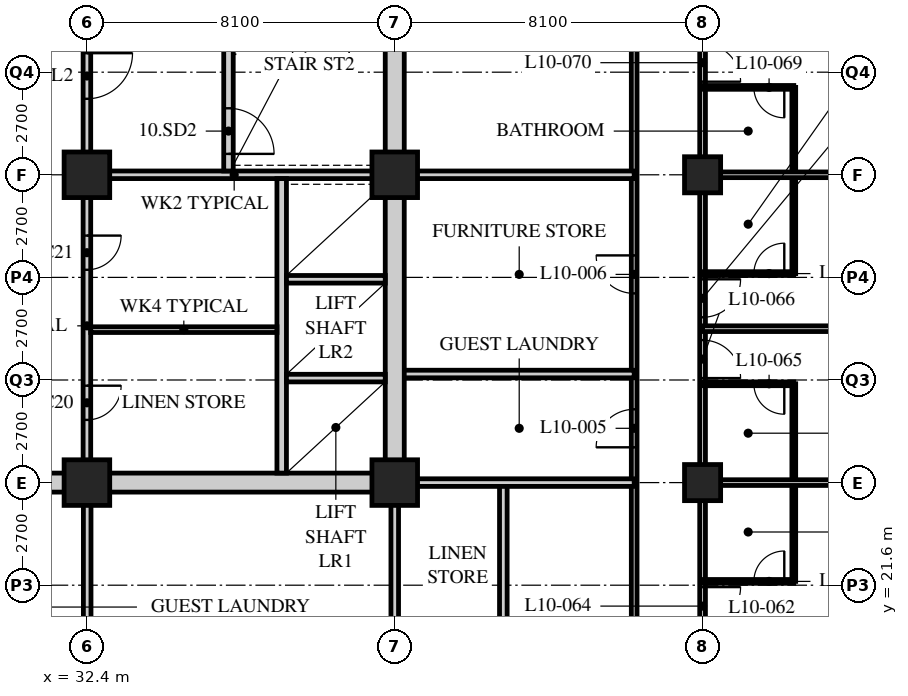
"""IFC4 building model, lengths in metres.
Left out: names, types, materials, properties, quantities, classifications, styles, units other than length and angle.
Written with IfcOpenShell. Run it as: python <this file> out.ifc"""

import sys

from ifc_helpers import new_model, si_unit, direction, frame, frame_2d, origin, origin_2d, place, context, subcontext, project, spatial, rectangle, hollow_rectangle, extrude, element, fill, save


model = new_model("IFC4")
c1 = context("Model", 3, precision=1e-05, world=origin(), true_north=direction((0.0, 1.0)))
c2 = subcontext(c1, "Body", "Model", "MODEL_VIEW")
j1 = project(units=[si_unit("LENGTHUNIT", "METRE"), si_unit("PLANEANGLEUNIT", "RADIAN")], contexts=[c1])
p1 = place(None, origin())
s1 = spatial("IfcSite", under=j1, at=p1, CompositionType="ELEMENT")
p2 = place(p1, origin())
s2 = spatial("IfcBuilding", under=s1, at=p2, CompositionType="ELEMENT")
p3 = place(p2, frame((0.0, 0.0, 46.6)))
s3 = spatial("IfcBuildingStorey", under=s2, at=p3, CompositionType="ELEMENT", Elevation=46.6)
for number, where, z_axis, x_axis in (
    (1, (32.4, 24.3, 0.0), (0.0, 0.0, 1.0), (1.0, 0.0, 0.0)),
    (2, (32.4, 32.4, 0.0), (0.0, 0.0, 1.0), (1.0, 0.0, 0.0)),
    (3, (40.5, 24.3, 0.0), (0.0, 0.0, 1.0), (1.0, 0.0, 0.0)),
    (4, (40.5, 32.4, 0.0), (0.0, 0.0, 1.0), (1.0, 0.0, 0.0)),
):
    element("IfcColumn", number, at=place(p3, frame(where, z_axis=z_axis, x_axis=x_axis)), inside=s3, PredefinedType="COLUMN", context=c2, shape_type="SweptSolid", body=[
        extrude(hollow_rectangle(XDim=1.2, YDim=1.2, WallThickness=0.12, at=origin_2d()), origin(), (0.0, 0.0, 1.0), 3.4),
    ])
for number, where, z_axis, x_axis in (
    (5, (48.6, 24.3, 0.0), (0.0, 0.0, 1.0), (1.0, 0.0, 0.0)),
    (6, (48.6, 32.4, 0.0), (0.0, 0.0, 1.0), (1.0, 0.0, 0.0)),
):
    element("IfcColumn", number, at=place(p3, frame(where, z_axis=z_axis, x_axis=x_axis)), inside=s3, PredefinedType="COLUMN", context=c2, shape_type="SweptSolid", body=[
        extrude(hollow_rectangle(XDim=0.95, YDim=0.95, WallThickness=0.095, at=origin_2d()), origin(), (0.0, 0.0, 1.0), 3.4),
    ])
p4 = place(p3, frame((48.6, 16.2, 0.0), z_axis=(0.0, 0.0, 1.0), x_axis=(0.0, 1.0, 0.0)))
e7 = element("IfcWall", 7, at=p4, inside=s3, PredefinedType="PARTITIONING", context=c2, shape_type="SweptSolid", body=[
    extrude(rectangle(XDim=26.1, YDim=0.15, at=frame_2d((13.05, 0.0))), origin(), (0.0, 0.0, 1.0), 2.578),
])
p5 = place(p4, frame((2.75, 0.0, 0.0)))
e8 = element("IfcOpeningElement", 8, at=p5, cuts=e7, PredefinedType="OPENING", context=c2, shape_type="SweptSolid", body=[
    extrude(rectangle(XDim=1.0, YDim=2.1, at=frame_2d((0.5, 1.05))), frame((0.0, 0.085, 0.0), z_axis=(0.0, -1.0, 0.0), x_axis=(1.0, 0.0, 0.0)), (0.0, 0.0, 1.0), 0.17),
])
p6 = place(p4, frame((4.35, 0.0, 0.0)))
e9 = element("IfcOpeningElement", 9, at=p6, cuts=e7, PredefinedType="OPENING", context=c2, shape_type="SweptSolid", body=[
    extrude(rectangle(XDim=1.0, YDim=2.1, at=frame_2d((0.5, 1.05))), frame((0.0, 0.085, 0.0), z_axis=(0.0, -1.0, 0.0), x_axis=(1.0, 0.0, 0.0)), (0.0, 0.0, 1.0), 0.17),
])
p7 = place(p4, frame((10.85, 0.0, 0.0)))
e10 = element("IfcOpeningElement", 10, at=p7, cuts=e7, PredefinedType="OPENING", context=c2, shape_type="SweptSolid", body=[
    extrude(rectangle(XDim=1.0, YDim=2.1, at=frame_2d((0.5, 1.05))), frame((0.0, 0.085, 0.0), z_axis=(0.0, -1.0, 0.0), x_axis=(1.0, 0.0, 0.0)), (0.0, 0.0, 1.0), 0.17),
])
p8 = place(p4, frame((12.45, 0.0, 0.0)))
e11 = element("IfcOpeningElement", 11, at=p8, cuts=e7, PredefinedType="OPENING", context=c2, shape_type="SweptSolid", body=[
    extrude(rectangle(XDim=1.0, YDim=2.1, at=frame_2d((0.5, 1.05))), frame((0.0, 0.085, 0.0), z_axis=(0.0, -1.0, 0.0), x_axis=(1.0, 0.0, 0.0)), (0.0, 0.0, 1.0), 0.17),
])
p9 = place(p4, frame((18.65, 0.0, 0.0)))
e12 = element("IfcOpeningElement", 12, at=p9, cuts=e7, PredefinedType="OPENING", context=c2, shape_type="SweptSolid", body=[
    extrude(rectangle(XDim=1.0, YDim=2.1, at=frame_2d((0.5, 1.05))), frame((0.0, 0.085, 0.0), z_axis=(0.0, -1.0, 0.0), x_axis=(1.0, 0.0, 0.0)), (0.0, 0.0, 1.0), 0.17),
])
p10 = place(p4, frame((22.7, 0.0, 0.0)))
e13 = element("IfcOpeningElement", 13, at=p10, cuts=e7, PredefinedType="OPENING", context=c2, shape_type="SweptSolid", body=[
    extrude(rectangle(XDim=1.0, YDim=2.1, at=frame_2d((0.5, 1.05))), frame((0.0, 0.085, 0.0), z_axis=(0.0, -1.0, 0.0), x_axis=(1.0, 0.0, 0.0)), (0.0, 0.0, 1.0), 0.17),
])
p11 = place(p3, frame((46.8, 18.0, 0.0), z_axis=(0.0, 0.0, 1.0), x_axis=(0.0, 1.0, 0.0)))
e14 = element("IfcWall", 14, at=p11, inside=s3, PredefinedType="PARTITIONING", context=c2, shape_type="SweptSolid", body=[
    extrude(rectangle(XDim=22.5, YDim=0.15, at=frame_2d((11.25, 0.0))), origin(), (0.0, 0.0, 1.0), 3.19),
])
p12 = place(p11, frame((7.229, 0.0, 0.0)))
e15 = element("IfcOpeningElement", 15, at=p12, cuts=e14, PredefinedType="OPENING", context=c2, shape_type="SweptSolid", body=[
    extrude(rectangle(XDim=1.0, YDim=2.1, at=frame_2d((0.5, 1.05))), frame((0.0, 0.085, 0.0), z_axis=(0.0, -1.0, 0.0), x_axis=(1.0, 0.0, 0.0)), (0.0, 0.0, 1.0), 0.17),
])
p13 = place(p11, frame((11.279, 0.0, 0.0)))
e16 = element("IfcOpeningElement", 16, at=p13, cuts=e14, PredefinedType="OPENING", context=c2, shape_type="SweptSolid", body=[
    extrude(rectangle(XDim=1.0, YDim=2.1, at=frame_2d((0.5, 1.05))), frame((0.0, 0.085, 0.0), z_axis=(0.0, -1.0, 0.0), x_axis=(1.0, 0.0, 0.0)), (0.0, 0.0, 1.0), 0.17),
])
p14 = place(p11, frame((17.95, 0.0, 0.0)))
e17 = element("IfcOpeningElement", 17, at=p14, cuts=e14, PredefinedType="OPENING", context=c2, shape_type="SweptSolid", body=[
    extrude(rectangle(XDim=1.0, YDim=2.1, at=frame_2d((0.5, 1.05))), frame((0.0, 0.085, 0.0), z_axis=(0.0, -1.0, 0.0), x_axis=(1.0, 0.0, 0.0)), (0.0, 0.0, 1.0), 0.17),
])
p15 = place(p3, frame((40.5, 32.4, 0.0), z_axis=(0.0, 0.0, 1.0), x_axis=(1.0, 0.0, 0.0)))
e18 = element("IfcWall", 18, at=p15, inside=s3, PredefinedType="SOLIDWALL", context=c2, shape_type="SweptSolid", body=[
    extrude(rectangle(XDim=6.3, YDim=0.2, at=frame_2d((3.15, 0.0))), origin(), (0.0, 0.0, 1.0), 2.578),
])
p16 = place(p3, frame((46.8, 27.157, 0.0), z_axis=(0.0, 0.0, 1.0), x_axis=(-1.0, 0.0, 0.0)))
e19 = element("IfcWall", 19, at=p16, inside=s3, PredefinedType="SOLIDWALL", context=c2, shape_type="SweptSolid", body=[
    extrude(rectangle(XDim=6.3, YDim=0.2, at=frame_2d((3.15, 0.0))), origin(), (0.0, 0.0, 1.0), 3.19),
])
for number, where, z_axis, x_axis in (
    (20, (40.5, 18.0, 0.0), (0.0, 0.0, 1.0), (0.0, 1.0, 0.0)),
    (21, (32.407, 18.0, 0.0), (0.0, 0.0, 1.0), (0.0, 1.0, 0.0)),
):
    element("IfcWall", number, at=place(p3, frame(where, z_axis=z_axis, x_axis=x_axis)), inside=s3, PredefinedType="SOLIDWALL", context=c2, shape_type="SweptSolid", body=[
        extrude(rectangle(XDim=6.3, YDim=0.2, at=frame_2d((3.15, 0.0))), origin(), (0.0, 0.0, 1.0), 2.578),
    ])
p17 = place(p3, frame((43.357, 18.0, 0.0), z_axis=(0.0, 0.0, 1.0), x_axis=(0.0, 1.0, 0.0)))
e22 = element("IfcWall", 22, at=p17, inside=s3, PredefinedType="SOLIDWALL", context=c2, shape_type="SweptSolid", body=[
    extrude(rectangle(XDim=6.3, YDim=0.2, at=frame_2d((3.15, 0.0))), origin(), (0.0, 0.0, 1.0), 3.19),
])
p18 = place(p3, frame((40.5, 24.3, 0.0), z_axis=(0.0, 0.0, 1.0), x_axis=(1.0, 0.0, 0.0)))
e23 = element("IfcWall", 23, at=p18, inside=s3, PredefinedType="SOLIDWALL", context=c2, shape_type="SweptSolid", body=[
    extrude(rectangle(XDim=6.3, YDim=0.2, at=frame_2d((3.15, 0.0))), origin(), (0.0, 0.0, 1.0), 2.578),
])
p19 = place(p3, frame((51.0, 21.7, 0.0), z_axis=(0.0, 0.0, 1.0), x_axis=(0.0, 1.0, 0.0)))
e24 = element("IfcWall", 24, at=p19, inside=s3, PredefinedType="PARTITIONING", context=c2, shape_type="SweptSolid", body=[
    extrude(rectangle(XDim=5.2, YDim=0.1, at=frame_2d((2.6, 0.0))), origin(), (0.0, 0.0, 1.0), 3.19),
])
p20 = place(p3, frame((48.6, 21.7, 0.0), z_axis=(0.0, 0.0, 1.0), x_axis=(1.0, 0.0, 0.0)))
e25 = element("IfcWall", 25, at=p20, inside=s3, PredefinedType="PARTITIONING", context=c2, shape_type="SweptSolid", body=[
    extrude(rectangle(XDim=2.4, YDim=0.1, at=frame_2d((1.2, 0.0))), origin(), (0.0, 0.0, 1.0), 3.19),
])
p21 = place(p20, frame((1.35, 0.0, 0.0)))
e26 = element("IfcOpeningElement", 26, at=p21, cuts=e25, PredefinedType="OPENING", context=c2, shape_type="SweptSolid", body=[
    extrude(rectangle(XDim=0.8, YDim=2.1, at=frame_2d((0.4, 1.05))), frame((0.0, 0.06, 0.0), z_axis=(0.0, -1.0, 0.0), x_axis=(1.0, 0.0, 0.0)), (0.0, 0.0, 1.0), 0.12),
])
p22 = place(p3, frame((48.6, 24.3, 0.0), z_axis=(0.0, 0.0, 1.0), x_axis=(1.0, 0.0, 0.0)))
e27 = element("IfcWall", 27, at=p22, inside=s3, PredefinedType="PARTITIONING", context=c2, shape_type="SweptSolid", body=[
    extrude(rectangle(XDim=7.8, YDim=0.15, at=frame_2d((3.9, 0.0))), origin(), (0.0, 0.0, 1.0), 2.578),
])
p23 = place(p3, frame((48.6, 26.9, 0.0), z_axis=(0.0, 0.0, 1.0), x_axis=(1.0, 0.0, 0.0)))
e28 = element("IfcWall", 28, at=p23, inside=s3, PredefinedType="PARTITIONING", context=c2, shape_type="SweptSolid", body=[
    extrude(rectangle(XDim=2.4, YDim=0.1, at=frame_2d((1.2, 0.0))), origin(), (0.0, 0.0, 1.0), 3.19),
])
p24 = place(p23, frame((1.35, 0.0, 0.0)))
e29 = element("IfcOpeningElement", 29, at=p24, cuts=e28, PredefinedType="OPENING", context=c2, shape_type="SweptSolid", body=[
    extrude(rectangle(XDim=0.8, YDim=2.1, at=frame_2d((0.4, 1.05))), frame((0.0, 0.06, 0.0), z_axis=(0.0, -1.0, 0.0), x_axis=(1.0, 0.0, 0.0)), (0.0, 0.0, 1.0), 0.12),
])
p25 = place(p3, frame((48.6, 28.35, 0.0), z_axis=(0.0, 0.0, 1.0), x_axis=(1.0, 0.0, 0.0)))
e30 = element("IfcWall", 30, at=p25, inside=s3, PredefinedType="PARTITIONING", context=c2, shape_type="SweptSolid", body=[
    extrude(rectangle(XDim=7.8, YDim=0.15, at=frame_2d((3.9, 0.0))), origin(), (0.0, 0.0, 1.0), 3.19),
])
p26 = place(p3, frame((51.0, 29.8, 0.0), z_axis=(0.0, 0.0, 1.0), x_axis=(0.0, 1.0, 0.0)))
e31 = element("IfcWall", 31, at=p26, inside=s3, PredefinedType="PARTITIONING", context=c2, shape_type="SweptSolid", body=[
    extrude(rectangle(XDim=4.9, YDim=0.1, at=frame_2d((2.45, 0.0))), origin(), (0.0, 0.0, 1.0), 3.19),
])
p27 = place(p3, frame((48.6, 29.8, 0.0), z_axis=(0.0, 0.0, 1.0), x_axis=(1.0, 0.0, 0.0)))
e32 = element("IfcWall", 32, at=p27, inside=s3, PredefinedType="PARTITIONING", context=c2, shape_type="SweptSolid", body=[
    extrude(rectangle(XDim=2.4, YDim=0.1, at=frame_2d((1.2, 0.0))), origin(), (0.0, 0.0, 1.0), 3.19),
])
p28 = place(p27, frame((1.35, 0.0, 0.0)))
e33 = element("IfcOpeningElement", 33, at=p28, cuts=e32, PredefinedType="OPENING", context=c2, shape_type="SweptSolid", body=[
    extrude(rectangle(XDim=0.8, YDim=2.1, at=frame_2d((0.4, 1.05))), frame((0.0, 0.06, 0.0), z_axis=(0.0, -1.0, 0.0), x_axis=(1.0, 0.0, 0.0)), (0.0, 0.0, 1.0), 0.12),
])
p29 = place(p3, frame((48.6, 32.4, 0.0), z_axis=(0.0, 0.0, 1.0), x_axis=(1.0, 0.0, 0.0)))
e34 = element("IfcWall", 34, at=p29, inside=s3, PredefinedType="PARTITIONING", context=c2, shape_type="SweptSolid", body=[
    extrude(rectangle(XDim=7.8, YDim=0.15, at=frame_2d((3.9, 0.0))), origin(), (0.0, 0.0, 1.0), 2.578),
])
p30 = place(p3, frame((48.6, 34.7, 0.0), z_axis=(0.0, 0.0, 1.0), x_axis=(1.0, 0.0, 0.0)))
e35 = element("IfcWall", 35, at=p30, inside=s3, PredefinedType="PARTITIONING", context=c2, shape_type="SweptSolid", body=[
    extrude(rectangle(XDim=2.4, YDim=0.1, at=frame_2d((1.2, 0.0))), origin(), (0.0, 0.0, 1.0), 3.19),
])
p31 = place(p30, frame((1.35, 0.0, 0.0)))
e36 = element("IfcOpeningElement", 36, at=p31, cuts=e35, PredefinedType="OPENING", context=c2, shape_type="SweptSolid", body=[
    extrude(rectangle(XDim=0.8, YDim=2.1, at=frame_2d((0.4, 1.05))), frame((0.0, 0.06, 0.0), z_axis=(0.0, -1.0, 0.0), x_axis=(1.0, 0.0, 0.0)), (0.0, 0.0, 1.0), 0.12),
])
p32 = place(p3, frame((15.95, 24.3, 0.0), z_axis=(0.0, 0.0, 1.0), x_axis=(1.0, 0.0, 0.0)))
e37 = element("IfcWall", 37, at=p32, inside=s3, PredefinedType="SOLIDWALL", context=c2, shape_type="SweptSolid", body=[
    extrude(rectangle(XDim=24.8, YDim=0.5, at=frame_2d((12.4, 0.0))), origin(), (0.0, 0.0, 1.0), 2.54),
])
p33 = place(p32, frame((11.5, 0.0, 0.0)))
e38 = element("IfcOpeningElement", 38, at=p33, cuts=e37, PredefinedType="OPENING", context=c2, shape_type="SweptSolid", body=[
    extrude(rectangle(XDim=1.8, YDim=2.4, at=frame_2d((0.9, 1.2))), frame((0.0, 0.26, 0.0), z_axis=(0.0, -1.0, 0.0), x_axis=(1.0, 0.0, 0.0)), (0.0, 0.0, 1.0), 0.52),
])
p34 = place(p3, frame((40.5, 24.55, 0.0), z_axis=(0.0, 0.0, 1.0), x_axis=(0.0, 1.0, 0.0)))
e39 = element("IfcWall", 39, at=p34, inside=s3, PredefinedType="SOLIDWALL", context=c2, shape_type="SweptSolid", body=[
    extrude(rectangle(XDim=15.7, YDim=0.5, at=frame_2d((7.85, 0.0))), origin(), (0.0, 0.0, 1.0), 2.578),
])
p35 = place(p3, frame((32.3, 32.4, 0.0), z_axis=(0.0, 0.0, 1.0), x_axis=(1.0, 0.0, 0.0)))
e40 = element("IfcWall", 40, at=p35, inside=s3, PredefinedType="SOLIDWALL", context=c2, shape_type="SweptSolid", body=[
    extrude(rectangle(XDim=7.95, YDim=0.2, at=frame_2d((3.975, 0.0))), origin(), (0.0, 0.0, 1.0), 2.578),
])
p36 = place(p3, frame((32.4, 32.5, 0.0), z_axis=(0.0, 0.0, 1.0), x_axis=(0.0, 1.0, 0.0)))
e41 = element("IfcWall", 41, at=p36, inside=s3, PredefinedType="SOLIDWALL", context=c2, shape_type="SweptSolid", body=[
    extrude(rectangle(XDim=7.75, YDim=0.2, at=frame_2d((3.875, 0.0))), origin(), (0.0, 0.0, 1.0), 2.578),
])
p37 = place(p36, frame((1.9, 0.0, 0.0)))
e42 = element("IfcOpeningElement", 42, at=p37, cuts=e41, PredefinedType="OPENING", context=c2, shape_type="SweptSolid", body=[
    extrude(rectangle(XDim=1.2, YDim=2.1, at=frame_2d((0.6, 1.05))), frame((0.0, 0.11, 0.0), z_axis=(0.0, -1.0, 0.0), x_axis=(1.0, 0.0, 0.0)), (0.0, 0.0, 1.0), 0.22),
])
p38 = place(p3, frame((37.525, 24.55, 0.0), z_axis=(0.0, 0.0, 1.0), x_axis=(0.0, 1.0, 0.0)))
e43 = element("IfcWall", 43, at=p38, inside=s3, PredefinedType="SOLIDWALL", context=c2, shape_type="SweptSolid", body=[
    extrude(rectangle(XDim=7.75, YDim=0.25, at=frame_2d((3.875, 0.0))), origin(), (0.0, 0.0, 1.0), 3.19),
])
for number, where, z_axis, x_axis in (
    (44, (37.65, 27.05, 0.0), (0.0, 0.0, 1.0), (1.0, 0.0, 0.0)),
    (45, (37.65, 29.65, 0.0), (0.0, 0.0, 1.0), (1.0, 0.0, 0.0)),
):
    element("IfcWall", number, at=place(p3, frame(where, z_axis=z_axis, x_axis=x_axis)), inside=s3, PredefinedType="SOLIDWALL", context=c2, shape_type="SweptSolid", body=[
        extrude(rectangle(XDim=2.6, YDim=0.2, at=frame_2d((1.3, 0.0))), origin(), (0.0, 0.0, 1.0), 3.19),
    ])
p39 = place(p3, frame((36.125, 32.5, 0.0), z_axis=(0.0, 0.0, 1.0), x_axis=(0.0, 1.0, 0.0)))
e46 = element("IfcWall", 46, at=p39, inside=s3, PredefinedType="SOLIDWALL", context=c2, shape_type="SweptSolid", body=[
    extrude(rectangle(XDim=7.75, YDim=0.25, at=frame_2d((3.875, 0.0))), origin(), (0.0, 0.0, 1.0), 3.19),
])
p40 = place(p39, frame((0.45, 0.0, 0.0)))
e47 = element("IfcOpeningElement", 47, at=p40, cuts=e46, PredefinedType="OPENING", context=c2, shape_type="SweptSolid", body=[
    extrude(rectangle(XDim=1.2, YDim=2.1, at=frame_2d((0.6, 1.05))), frame((0.0, 0.135, 0.0), z_axis=(0.0, -1.0, 0.0), x_axis=(1.0, 0.0, 0.0)), (0.0, 0.0, 1.0), 0.27),
])
p41 = place(p3, frame((32.4, 24.55, 0.0), z_axis=(0.0, 0.0, 1.0), x_axis=(0.0, 1.0, 0.0)))
e48 = element("IfcWall", 48, at=p41, inside=s3, PredefinedType="PARTITIONING", context=c2, shape_type="SweptSolid", body=[
    extrude(rectangle(XDim=7.75, YDim=0.2, at=frame_2d((3.875, 0.0))), origin(), (0.0, 0.0, 1.0), 2.578),
])
p42 = place(p41, frame((1.4, 0.0, 0.0)))
e49 = element("IfcOpeningElement", 49, at=p42, cuts=e48, PredefinedType="OPENING", context=c2, shape_type="SweptSolid", body=[
    extrude(rectangle(XDim=0.9, YDim=2.1, at=frame_2d((0.45, 1.05))), frame((0.0, 0.11, 0.0), z_axis=(0.0, -1.0, 0.0), x_axis=(1.0, 0.0, 0.0)), (0.0, 0.0, 1.0), 0.22),
])
p43 = place(p41, frame((5.35, 0.0, 0.0)))
e50 = element("IfcOpeningElement", 50, at=p43, cuts=e48, PredefinedType="OPENING", context=c2, shape_type="SweptSolid", body=[
    extrude(rectangle(XDim=0.9, YDim=2.1, at=frame_2d((0.45, 1.05))), frame((0.0, 0.11, 0.0), z_axis=(0.0, -1.0, 0.0), x_axis=(1.0, 0.0, 0.0)), (0.0, 0.0, 1.0), 0.22),
])
p44 = place(p3, frame((32.5, 28.325, 0.0), z_axis=(0.0, 0.0, 1.0), x_axis=(1.0, 0.0, 0.0)))
e51 = element("IfcWall", 51, at=p44, inside=s3, PredefinedType="PARTITIONING", context=c2, shape_type="SweptSolid", body=[
    extrude(rectangle(XDim=4.9, YDim=0.15, at=frame_2d((2.45, 0.0))), origin(), (0.0, 0.0, 1.0), 3.19),
])
p45 = place(p12, origin())
e52 = element("IfcDoor", 52, at=p45, inside=s3, OperationType="SINGLE_SWING_LEFT", PredefinedType="DOOR", context=c2, shape_type="SweptSolid", body=[
    extrude(rectangle(XDim=1.0, YDim=2.1, at=frame_2d((0.5, 1.05))), frame((0.0, 0.025, 0.0), z_axis=(0.0, -1.0, 0.0), x_axis=(1.0, 0.0, 0.0)), (0.0, 0.0, 1.0), 0.05),
])
fill(e15, e52)
p46 = place(p13, origin())
e53 = element("IfcDoor", 53, at=p46, inside=s3, OperationType="SINGLE_SWING_RIGHT", PredefinedType="DOOR", context=c2, shape_type="SweptSolid", body=[
    extrude(rectangle(XDim=1.0, YDim=2.1, at=frame_2d((0.5, 1.05))), frame((0.0, 0.025, 0.0), z_axis=(0.0, -1.0, 0.0), x_axis=(1.0, 0.0, 0.0)), (0.0, 0.0, 1.0), 0.05),
])
fill(e16, e53)
p47 = place(p21, origin())
e54 = element("IfcDoor", 54, at=p47, inside=s3, OperationType="SINGLE_SWING_RIGHT", PredefinedType="DOOR", context=c2, shape_type="SweptSolid", body=[
    extrude(rectangle(XDim=0.8, YDim=2.1, at=frame_2d((0.4, 1.05))), frame((0.0, 0.025, 0.0), z_axis=(0.0, -1.0, 0.0), x_axis=(1.0, 0.0, 0.0)), (0.0, 0.0, 1.0), 0.05),
])
fill(e26, e54)
p48 = place(p6, origin())
e55 = element("IfcDoor", 55, at=p48, inside=s3, OperationType="SINGLE_SWING_LEFT", PredefinedType="DOOR", context=c2, shape_type="SweptSolid", body=[
    extrude(rectangle(XDim=1.0, YDim=2.1, at=frame_2d((0.5, 1.05))), frame((0.0, 0.025, 0.0), z_axis=(0.0, -1.0, 0.0), x_axis=(1.0, 0.0, 0.0)), (0.0, 0.0, 1.0), 0.05),
])
fill(e9, e55)
p49 = place(p24, origin())
e56 = element("IfcDoor", 56, at=p49, inside=s3, OperationType="SINGLE_SWING_LEFT", PredefinedType="DOOR", context=c2, shape_type="SweptSolid", body=[
    extrude(rectangle(XDim=0.8, YDim=2.1, at=frame_2d((0.4, 1.05))), frame((0.0, 0.025, 0.0), z_axis=(0.0, -1.0, 0.0), x_axis=(1.0, 0.0, 0.0)), (0.0, 0.0, 1.0), 0.05),
])
fill(e29, e56)
p50 = place(p7, origin())
e57 = element("IfcDoor", 57, at=p50, inside=s3, OperationType="SINGLE_SWING_RIGHT", PredefinedType="DOOR", context=c2, shape_type="SweptSolid", body=[
    extrude(rectangle(XDim=1.0, YDim=2.1, at=frame_2d((0.5, 1.05))), frame((0.0, 0.025, 0.0), z_axis=(0.0, -1.0, 0.0), x_axis=(1.0, 0.0, 0.0)), (0.0, 0.0, 1.0), 0.05),
])
fill(e10, e57)
p51 = place(p28, origin())
e58 = element("IfcDoor", 58, at=p51, inside=s3, OperationType="SINGLE_SWING_RIGHT", PredefinedType="DOOR", context=c2, shape_type="SweptSolid", body=[
    extrude(rectangle(XDim=0.8, YDim=2.1, at=frame_2d((0.4, 1.05))), frame((0.0, 0.025, 0.0), z_axis=(0.0, -1.0, 0.0), x_axis=(1.0, 0.0, 0.0)), (0.0, 0.0, 1.0), 0.05),
])
fill(e33, e58)
p52 = place(p8, origin())
e59 = element("IfcDoor", 59, at=p52, inside=s3, OperationType="SINGLE_SWING_LEFT", PredefinedType="DOOR", context=c2, shape_type="SweptSolid", body=[
    extrude(rectangle(XDim=1.0, YDim=2.1, at=frame_2d((0.5, 1.05))), frame((0.0, 0.025, 0.0), z_axis=(0.0, -1.0, 0.0), x_axis=(1.0, 0.0, 0.0)), (0.0, 0.0, 1.0), 0.05),
])
fill(e11, e59)
p53 = place(p31, origin())
e60 = element("IfcDoor", 60, at=p53, inside=s3, OperationType="SINGLE_SWING_LEFT", PredefinedType="DOOR", context=c2, shape_type="SweptSolid", body=[
    extrude(rectangle(XDim=0.8, YDim=2.1, at=frame_2d((0.4, 1.05))), frame((0.0, 0.025, 0.0), z_axis=(0.0, -1.0, 0.0), x_axis=(1.0, 0.0, 0.0)), (0.0, 0.0, 1.0), 0.05),
])
fill(e36, e60)
p54 = place(p9, origin())
e61 = element("IfcDoor", 61, at=p54, inside=s3, OperationType="SINGLE_SWING_RIGHT", PredefinedType="DOOR", context=c2, shape_type="SweptSolid", body=[
    extrude(rectangle(XDim=1.0, YDim=2.1, at=frame_2d((0.5, 1.05))), frame((0.0, 0.025, 0.0), z_axis=(0.0, -1.0, 0.0), x_axis=(1.0, 0.0, 0.0)), (0.0, 0.0, 1.0), 0.05),
])
fill(e12, e61)
p55 = place(p42, origin())
e62 = element("IfcDoor", 62, at=p55, inside=s3, OperationType="SINGLE_SWING_LEFT", PredefinedType="DOOR", context=c2, shape_type="SweptSolid", body=[
    extrude(rectangle(XDim=0.9, YDim=2.1, at=frame_2d((0.45, 1.05))), frame((0.0, 0.025, 0.0), z_axis=(0.0, -1.0, 0.0), x_axis=(1.0, 0.0, 0.0)), (0.0, 0.0, 1.0), 0.05),
])
fill(e49, e62)
p56 = place(p43, origin())
e63 = element("IfcDoor", 63, at=p56, inside=s3, OperationType="SINGLE_SWING_LEFT", PredefinedType="DOOR", context=c2, shape_type="SweptSolid", body=[
    extrude(rectangle(XDim=0.9, YDim=2.1, at=frame_2d((0.45, 1.05))), frame((0.0, 0.025, 0.0), z_axis=(0.0, -1.0, 0.0), x_axis=(1.0, 0.0, 0.0)), (0.0, 0.0, 1.0), 0.05),
])
fill(e50, e63)
p57 = place(p40, origin())
e64 = element("IfcDoor", 64, at=p57, inside=s3, OperationType="SINGLE_SWING_RIGHT", PredefinedType="DOOR", context=c2, shape_type="SweptSolid", body=[
    extrude(rectangle(XDim=1.2, YDim=2.1, at=frame_2d((0.6, 1.05))), frame((0.0, 0.025, 0.0), z_axis=(0.0, -1.0, 0.0), x_axis=(1.0, 0.0, 0.0)), (0.0, 0.0, 1.0), 0.05),
])
fill(e47, e64)
p58 = place(p37, origin())
e65 = element("IfcDoor", 65, at=p58, inside=s3, OperationType="SINGLE_SWING_LEFT", PredefinedType="DOOR", context=c2, shape_type="SweptSolid", body=[
    extrude(rectangle(XDim=1.2, YDim=2.1, at=frame_2d((0.6, 1.05))), frame((0.0, 0.025, 0.0), z_axis=(0.0, -1.0, 0.0), x_axis=(1.0, 0.0, 0.0)), (0.0, 0.0, 1.0), 0.05),
])
fill(e42, e65)
save(model, sys.argv[1])
